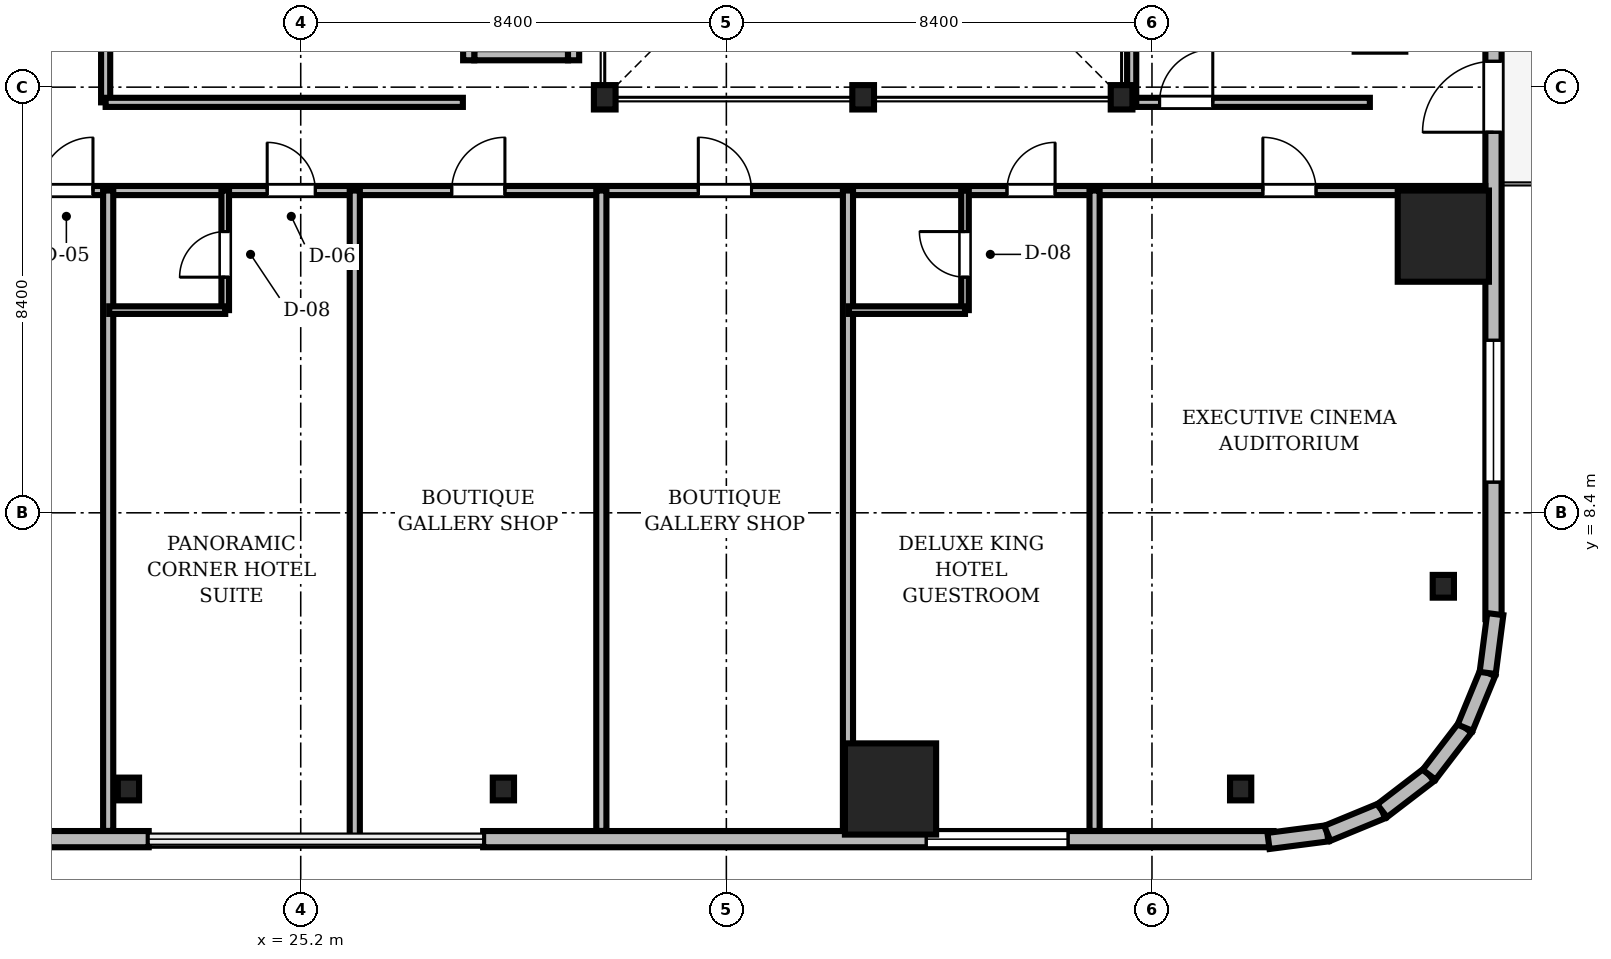
"""IFC4 building model, lengths in metres.
Left out: names, types, materials, properties, quantities, classifications, styles, units other than length and angle.
Written with IfcOpenShell. Run it as: python <this file> out.ifc"""

import sys

from ifc_helpers import new_model, si_unit, direction, frame, frame_2d, origin, origin_2d, place, context, subcontext, project, spatial, rectangle, i_section, extrude, source, transform, mapped, element, fill, save


model = new_model("IFC4")
c1 = context("Model", 3, precision=1e-05, world=origin(), true_north=direction((0.0, 1.0)))
c2 = subcontext(c1, "Body", "Model", "MODEL_VIEW")
j1 = project(units=[si_unit("LENGTHUNIT", "METRE"), si_unit("PLANEANGLEUNIT", "RADIAN")], contexts=[c1])
p1 = place(None, origin())
s1 = spatial("IfcSite", under=j1, at=p1, CompositionType="ELEMENT")
p2 = place(p1, origin())
s2 = spatial("IfcBuilding", under=s1, at=p2, CompositionType="ELEMENT")
p3 = place(p2, frame((0.0, 0.0, 49.5)))
s3 = spatial("IfcBuildingStorey", under=s2, at=p3, CompositionType="ELEMENT", Elevation=49.5)
m1 = source(origin(), c2, "Body", "SweptSolid", [
    extrude(i_section(OverallWidth=0.428, OverallDepth=0.481, WebThickness=0.04, FlangeThickness=0.063, FilletRadius=0.015, at=origin_2d()), origin(), (0.0, 0.0, 1.0), 3.41),
])
for number, where, z_axis, x_axis in (
    (1, (31.2, 16.6, 0.0), (0.0, 0.0, 1.0), (1.0, 0.0, 0.0)),
    (2, (36.3, 16.6, 0.0), (0.0, 0.0, 1.0), (1.0, 0.0, 0.0)),
    (3, (41.4, 16.6, 0.0), (0.0, 0.0, 1.0), (1.0, 0.0, 0.0)),
):
    element("IfcColumn", number, at=place(p3, frame(where, z_axis=z_axis, x_axis=x_axis)), inside=s3, PredefinedType="COLUMN", context=c2, shape_type="MappedRepresentation", body=[
        mapped(m1, transform((0.0, 0.0, 0.0), scale=1.0)),
    ])
m2 = source(origin(), c2, "Body", "SweptSolid", [
    extrude(rectangle(XDim=1.8, YDim=1.8, at=origin_2d()), origin(), (0.0, 0.0, 1.0), 3.41),
])
for number, where, z_axis, x_axis in (
    (4, (36.84, 2.95, 0.0), (0.0, 0.0, 1.0), (1.0, 0.0, 0.0)),
    (5, (47.75, 13.86, 0.0), (0.0, 0.0, 1.0), (1.0, 0.0, 0.0)),
):
    element("IfcColumn", number, at=place(p3, frame(where, z_axis=z_axis, x_axis=x_axis)), inside=s3, PredefinedType="COLUMN", context=c2, shape_type="MappedRepresentation", body=[
        mapped(m2, transform((0.0, 0.0, 0.0), scale=1.0)),
    ])
m3 = source(origin(), c2, "Body", "SweptSolid", [
    extrude(i_section(OverallWidth=0.419, OverallDepth=0.449, WebThickness=0.031, FlangeThickness=0.048, FilletRadius=0.015, at=origin_2d()), origin(), (0.0, 0.0, 1.0), 3.41),
])
for number, where, z_axis, x_axis in (
    (6, (21.8, 2.95, 0.0), (0.0, 0.0, 1.0), (1.0, 0.0, 0.0)),
    (7, (29.2, 2.95, 0.0), (0.0, 0.0, 1.0), (1.0, 0.0, 0.0)),
    (8, (43.75, 2.95, 0.0), (0.0, 0.0, 1.0), (1.0, 0.0, 0.0)),
    (9, (47.75, 6.95, 0.0), (0.0, 0.0, 1.0), (1.0, 0.0, 0.0)),
):
    element("IfcColumn", number, at=place(p3, frame(where, z_axis=z_axis, x_axis=x_axis)), inside=s3, PredefinedType="COLUMN", context=c2, shape_type="MappedRepresentation", body=[
        mapped(m3, transform((0.0, 0.0, 0.0), scale=1.0)),
    ])
m4 = source(origin(), c2, "Body", "SweptSolid", [
    extrude(rectangle(XDim=15.6, YDim=0.32, at=frame_2d((7.8, 0.0))), origin(), (0.0, 0.0, 1.0), 3.41),
])
p4 = place(p3, frame((6.6, 1.96, 0.0), z_axis=(0.0, 0.0, 1.0), x_axis=(1.0, 0.0, 0.0)))
e10 = element("IfcWall", 10, at=p4, inside=s3, PredefinedType="SOLIDWALL", context=c2, shape_type="MappedRepresentation", body=[
    mapped(m4, transform((0.0, 0.0, 0.0), scale=1.0)),
])
m5 = source(origin(), c2, "Body", "SweptSolid", [
    extrude(rectangle(XDim=1.4, YDim=2.3, at=frame_2d((0.7, 1.15))), frame((0.0, 0.17, 0.0), z_axis=(0.0, -1.0, 0.0), x_axis=(1.0, 0.0, 0.0)), (0.0, 0.0, 1.0), 0.34),
])
p5 = place(p4, frame((9.61, 0.0, 0.0)))
e11 = element("IfcOpeningElement", 11, at=p5, cuts=e10, PredefinedType="OPENING", context=c2, shape_type="MappedRepresentation", body=[
    mapped(m5, transform((0.0, 0.0, 0.0), scale=1.0)),
])
m6 = source(origin(), c2, "Body", "SweptSolid", [
    extrude(rectangle(XDim=2.8, YDim=2.4, at=frame_2d((1.4, 1.2))), frame((0.0, 0.17, 0.0), z_axis=(0.0, -1.0, 0.0), x_axis=(1.0, 0.0, 0.0)), (0.0, 0.0, 1.0), 0.34),
])
p6 = place(p4, frame((2.705, 0.0, 0.72)))
e12 = element("IfcOpeningElement", 12, at=p6, cuts=e10, PredefinedType="OPENING", context=c2, shape_type="MappedRepresentation", body=[
    mapped(m6, transform((0.0, 0.0, 0.0), scale=1.0)),
])
p7 = place(p3, frame((28.8, 1.96, 0.0), z_axis=(0.0, 0.0, 1.0), x_axis=(1.0, 0.0, 0.0)))
e13 = element("IfcWall", 13, at=p7, inside=s3, PredefinedType="SOLIDWALL", context=c2, shape_type="MappedRepresentation", body=[
    mapped(m4, transform((0.0, 0.0, 0.0), scale=1.0)),
])
p8 = place(p7, frame((8.745, 0.0, 0.72)))
e14 = element("IfcOpeningElement", 14, at=p8, cuts=e13, PredefinedType="OPENING", context=c2, shape_type="MappedRepresentation", body=[
    mapped(m6, transform((0.0, 0.0, 0.0), scale=1.0)),
])
p9 = place(p3, frame((48.74, 6.3, 0.0), z_axis=(0.0, 0.0, 1.0), x_axis=(0.0, 1.0, 0.0)))
e15 = element("IfcWall", 15, at=p9, inside=s3, PredefinedType="SOLIDWALL", context=c2, shape_type="MappedRepresentation", body=[
    mapped(m4, transform((0.0, 0.0, 0.0), scale=1.0)),
])
p10 = place(p9, frame((9.61, 0.0, 0.0)))
e16 = element("IfcOpeningElement", 16, at=p10, cuts=e15, PredefinedType="OPENING", context=c2, shape_type="MappedRepresentation", body=[
    mapped(m5, transform((0.0, 0.0, 0.0), scale=1.0)),
])
p11 = place(p9, frame((2.705, 0.0, 0.72)))
e17 = element("IfcOpeningElement", 17, at=p11, cuts=e15, PredefinedType="OPENING", context=c2, shape_type="MappedRepresentation", body=[
    mapped(m6, transform((0.0, 0.0, 0.0), scale=1.0)),
])
m7 = source(origin(), c2, "Body", "SweptSolid", [
    extrude(rectangle(XDim=1.17, YDim=0.32, at=frame_2d((0.585, 0.0))), origin(), (0.0, 0.0, 1.0), 3.41),
])
p12 = place(p3, frame((44.3, 1.925, 0.0), z_axis=(0.0, 0.0, 1.0), x_axis=(0.991762485493, 0.128090485085, 0.0)))
e18 = element("IfcWall", 18, at=p12, inside=s3, PredefinedType="SOLIDWALL", context=c2, shape_type="MappedRepresentation", body=[
    mapped(m7, transform((0.0, 0.0, 0.0), scale=1.0)),
])
m8 = source(origin(), c2, "Body", "SweptSolid", [
    extrude(rectangle(XDim=1.169, YDim=0.32, at=frame_2d((0.585, 0.0))), origin(), (0.0, 0.0, 1.0), 3.41),
])
p13 = place(p3, frame((45.46, 2.074, 0.0), z_axis=(0.0, 0.0, 1.0), x_axis=(0.924479075121, 0.381232789334, 0.0)))
e19 = element("IfcWall", 19, at=p13, inside=s3, PredefinedType="SOLIDWALL", context=c2, shape_type="MappedRepresentation", body=[
    mapped(m8, transform((0.0, 0.0, 0.0), scale=1.0)),
])
m9 = source(origin(), c2, "Body", "SweptSolid", [
    extrude(rectangle(XDim=1.169, YDim=0.32, at=frame_2d((0.584, 0.0))), origin(), (0.0, 0.0, 1.0), 3.41),
])
p14 = place(p3, frame((46.541, 2.52, 0.0), z_axis=(0.0, 0.0, 1.0), x_axis=(0.793663520347, 0.608356981114, 0.0)))
e20 = element("IfcWall", 20, at=p14, inside=s3, PredefinedType="SOLIDWALL", context=c2, shape_type="MappedRepresentation", body=[
    mapped(m9, transform((0.0, 0.0, 0.0), scale=1.0)),
])
m10 = source(origin(), c2, "Body", "SweptSolid", [
    extrude(rectangle(XDim=1.169, YDim=0.32, at=frame_2d((0.584, 0.0))), origin(), (0.0, 0.0, 1.0), 3.41),
])
for number, where, z_axis, x_axis in (
    (21, (47.469, 3.231, 0.0), (0.0, 0.0, 1.0), (0.608, 0.794, 0.0)),
    (22, (48.18, 4.159, 0.0), (0.0, 0.0, 1.0), (0.381, 0.925, 0.0)),
):
    element("IfcWall", number, at=place(p3, frame(where, z_axis=z_axis, x_axis=x_axis)), inside=s3, PredefinedType="SOLIDWALL", context=c2, shape_type="MappedRepresentation", body=[
        mapped(m10, transform((0.0, 0.0, 0.0), scale=1.0)),
    ])
m11 = source(origin(), c2, "Body", "SweptSolid", [
    extrude(rectangle(XDim=1.171, YDim=0.32, at=frame_2d((0.585, 0.0))), origin(), (0.0, 0.0, 1.0), 3.41),
])
p15 = place(p3, frame((48.625, 5.24, 0.0), z_axis=(0.0, 0.0, 1.0), x_axis=(0.128269133229, 0.991739395941, 0.0)))
e23 = element("IfcWall", 23, at=p15, inside=s3, PredefinedType="SOLIDWALL", context=c2, shape_type="MappedRepresentation", body=[
    mapped(m11, transform((0.0, 0.0, 0.0), scale=1.0)),
])
m12 = source(origin(), c2, "Body", "SweptSolid", [
    extrude(rectangle(XDim=1.85, YDim=0.22, at=frame_2d((0.925, 0.0))), origin(), (0.0, 0.0, 1.0), 3.41),
])
p16 = place(p3, frame((28.625, 17.44, 0.0), z_axis=(0.0, 0.0, 1.0), x_axis=(1.0, 0.0, 0.0)))
e24 = element("IfcWall", 24, at=p16, inside=s3, PredefinedType="SOLIDWALL", context=c2, shape_type="MappedRepresentation", body=[
    mapped(m12, transform((0.0, 0.0, 0.0), scale=1.0)),
])
m13 = source(origin(), c2, "Body", "SweptSolid", [
    extrude(rectangle(XDim=2.54, YDim=0.22, at=frame_2d((1.27, 0.0))), origin(), (0.0, 0.0, 1.0), 3.41),
])
for number, where, z_axis, x_axis in (
    (25, (28.515, 17.33, 0.0), (0.0, 0.0, 1.0), (0.0, 1.0, 0.0)),
    (26, (30.585, 17.33, 0.0), (0.0, 0.0, 1.0), (0.0, 1.0, 0.0)),
):
    element("IfcWall", number, at=place(p3, frame(where, z_axis=z_axis, x_axis=x_axis)), inside=s3, PredefinedType="SOLIDWALL", context=c2, shape_type="MappedRepresentation", body=[
        mapped(m13, transform((0.0, 0.0, 0.0), scale=1.0)),
    ])
m14 = source(origin(), c2, "Body", "SweptSolid", [
    extrude(rectangle(XDim=46.156, YDim=0.18, at=frame_2d((23.078, 0.0))), origin(), (0.0, 0.0, 1.0), 2.652),
])
p17 = place(p3, frame((2.422, 14.76, 0.0), z_axis=(0.0, 0.0, 1.0), x_axis=(1.0, 0.0, 0.0)))
e27 = element("IfcWall", 27, at=p17, inside=s3, PredefinedType="PARTITIONING", context=c2, shape_type="MappedRepresentation", body=[
    mapped(m14, transform((0.0, 0.0, 0.0), scale=1.0)),
])
m15 = source(origin(), c2, "Body", "SweptSolid", [
    extrude(rectangle(XDim=1.05, YDim=2.2, at=frame_2d((0.525, 1.1))), frame((0.0, 0.1, 0.0), z_axis=(0.0, -1.0, 0.0), x_axis=(1.0, 0.0, 0.0)), (0.0, 0.0, 1.0), 0.2),
])
p18 = place(p17, frame((17.628, 0.0, 0.0)))
e28 = element("IfcOpeningElement", 28, at=p18, cuts=e27, PredefinedType="OPENING", context=c2, shape_type="MappedRepresentation", body=[
    mapped(m15, transform((0.0, 0.0, 0.0), scale=1.0)),
])
m16 = source(origin(), c2, "Body", "SweptSolid", [
    extrude(rectangle(XDim=0.95, YDim=2.15, at=frame_2d((0.475, 1.075))), frame((0.0, 0.1, 0.0), z_axis=(0.0, -1.0, 0.0), x_axis=(1.0, 0.0, 0.0)), (0.0, 0.0, 1.0), 0.2),
])
p19 = place(p17, frame((22.116, 0.0, 0.0)))
e29 = element("IfcOpeningElement", 29, at=p19, cuts=e27, PredefinedType="OPENING", context=c2, shape_type="MappedRepresentation", body=[
    mapped(m16, transform((0.0, 0.0, 0.0), scale=1.0)),
])
p20 = place(p17, frame((25.758, 0.0, 0.0)))
e30 = element("IfcOpeningElement", 30, at=p20, cuts=e27, PredefinedType="OPENING", context=c2, shape_type="MappedRepresentation", body=[
    mapped(m15, transform((0.0, 0.0, 0.0), scale=1.0)),
])
p21 = place(p17, frame((30.625, 0.0, 0.0)))
e31 = element("IfcOpeningElement", 31, at=p21, cuts=e27, PredefinedType="OPENING", context=c2, shape_type="MappedRepresentation", body=[
    mapped(m15, transform((0.0, 0.0, 0.0), scale=1.0)),
])
p22 = place(p17, frame((36.716, 0.0, 0.0)))
e32 = element("IfcOpeningElement", 32, at=p22, cuts=e27, PredefinedType="OPENING", context=c2, shape_type="MappedRepresentation", body=[
    mapped(m16, transform((0.0, 0.0, 0.0), scale=1.0)),
])
p23 = place(p17, frame((41.766, 0.0, 0.0)))
e33 = element("IfcOpeningElement", 33, at=p23, cuts=e27, PredefinedType="OPENING", context=c2, shape_type="MappedRepresentation", body=[
    mapped(m15, transform((0.0, 0.0, 0.0), scale=1.0)),
])
m17 = source(origin(), c2, "Body", "SweptSolid", [
    extrude(rectangle(XDim=11.94, YDim=0.18, at=frame_2d((5.97, 0.0))), origin(), (0.0, 0.0, 1.0), 2.802),
])
p24 = place(p3, frame((21.35, 16.5, 0.0), z_axis=(0.0, 0.0, 1.0), x_axis=(0.0, 1.0, 0.0)))
e34 = element("IfcWall", 34, at=p24, inside=s3, PredefinedType="PARTITIONING", context=c2, shape_type="MappedRepresentation", body=[
    mapped(m17, transform((0.0, 0.0, 0.0), scale=1.0)),
])
p25 = place(p24, frame((4.5, 0.0, 0.0)))
e35 = element("IfcOpeningElement", 35, at=p25, cuts=e34, PredefinedType="OPENING", context=c2, shape_type="MappedRepresentation", body=[
    mapped(m15, transform((0.0, 0.0, 0.0), scale=1.0)),
])
m18 = source(origin(), c2, "Body", "SweptSolid", [
    extrude(rectangle(XDim=4.7, YDim=0.18, at=frame_2d((2.35, 0.0))), origin(), (0.0, 0.0, 1.0), 2.802),
])
p26 = place(p3, frame((41.6, 16.5, 0.0), z_axis=(0.0, 0.0, 1.0), x_axis=(1.0, 0.0, 0.0)))
e36 = element("IfcWall", 36, at=p26, inside=s3, PredefinedType="PARTITIONING", context=c2, shape_type="MappedRepresentation", body=[
    mapped(m18, transform((0.0, 0.0, 0.0), scale=1.0)),
])
p27 = place(p26, frame((0.55, 0.0, 0.0)))
e37 = element("IfcOpeningElement", 37, at=p27, cuts=e36, PredefinedType="OPENING", context=c2, shape_type="MappedRepresentation", body=[
    mapped(m15, transform((0.0, 0.0, 0.0), scale=1.0)),
])
m19 = source(origin(), c2, "Body", "SweptSolid", [
    extrude(rectangle(XDim=2.36, YDim=0.15, at=frame_2d((1.18, 0.0))), origin(), (0.0, 0.0, 1.0), 3.41),
])
p28 = place(p3, frame((23.71, 12.4, 0.0), z_axis=(0.0, 0.0, 1.0), x_axis=(0.0, 1.0, 0.0)))
e38 = element("IfcWall", 38, at=p28, inside=s3, PredefinedType="PARTITIONING", context=c2, shape_type="MappedRepresentation", body=[
    mapped(m19, transform((0.0, 0.0, 0.0), scale=1.0)),
])
m20 = source(origin(), c2, "Body", "SweptSolid", [
    extrude(rectangle(XDim=0.9, YDim=2.1, at=frame_2d((0.45, 1.05))), frame((0.0, 0.085, 0.0), z_axis=(0.0, -1.0, 0.0), x_axis=(1.0, 0.0, 0.0)), (0.0, 0.0, 1.0), 0.17),
])
p29 = place(p28, frame((0.65, 0.0, 0.0)))
e39 = element("IfcOpeningElement", 39, at=p29, cuts=e38, PredefinedType="OPENING", context=c2, shape_type="MappedRepresentation", body=[
    mapped(m20, transform((0.0, 0.0, 0.0), scale=1.0)),
])
p30 = place(p3, frame((38.31, 12.4, 0.0), z_axis=(0.0, 0.0, 1.0), x_axis=(0.0, 1.0, 0.0)))
e40 = element("IfcWall", 40, at=p30, inside=s3, PredefinedType="PARTITIONING", context=c2, shape_type="MappedRepresentation", body=[
    mapped(m19, transform((0.0, 0.0, 0.0), scale=1.0)),
])
p31 = place(p30, frame((0.65, 0.0, 0.0)))
e41 = element("IfcOpeningElement", 41, at=p31, cuts=e40, PredefinedType="OPENING", context=c2, shape_type="MappedRepresentation", body=[
    mapped(m20, transform((0.0, 0.0, 0.0), scale=1.0)),
])
m21 = source(origin(), c2, "Body", "SweptSolid", [
    extrude(rectangle(XDim=12.638, YDim=0.2, at=frame_2d((6.319, 0.0))), origin(), (0.0, 0.0, 1.0), 2.652),
])
p32 = place(p3, frame((21.4, 2.122, 0.0), z_axis=(0.0, 0.0, 1.0), x_axis=(0.0, 1.0, 0.0)))
e42 = element("IfcWall", 42, at=p32, inside=s3, PredefinedType="PARTITIONING", context=c2, shape_type="MappedRepresentation", body=[
    mapped(m21, transform((0.0, 0.0, 0.0), scale=1.0)),
])
m22 = source(origin(), c2, "Body", "SweptSolid", [
    extrude(rectangle(XDim=12.83, YDim=0.2, at=frame_2d((6.415, 0.0))), origin(), (0.0, 0.0, 1.0), 2.652),
])
p33 = place(p3, frame((26.267, 1.93, 0.0), z_axis=(0.0, 0.0, 1.0), x_axis=(0.0, 1.0, 0.0)))
e43 = element("IfcWall", 43, at=p33, inside=s3, PredefinedType="PARTITIONING", context=c2, shape_type="MappedRepresentation", body=[
    mapped(m22, transform((0.0, 0.0, 0.0), scale=1.0)),
])
for number, where, z_axis, x_axis in (
    (44, (31.133, 2.122, 0.0), (0.0, 0.0, 1.0), (0.0, 1.0, 0.0)),
    (45, (36.0, 2.122, 0.0), (0.0, 0.0, 1.0), (0.0, 1.0, 0.0)),
    (46, (40.867, 2.122, 0.0), (0.0, 0.0, 1.0), (0.0, 1.0, 0.0)),
):
    element("IfcWall", number, at=place(p3, frame(where, z_axis=z_axis, x_axis=x_axis)), inside=s3, PredefinedType="PARTITIONING", context=c2, shape_type="MappedRepresentation", body=[
        mapped(m21, transform((0.0, 0.0, 0.0), scale=1.0)),
    ])
m23 = source(origin(), c2, "Body", "SweptSolid", [
    extrude(rectangle(XDim=7.15, YDim=0.18, at=frame_2d((3.575, 0.0))), origin(), (0.0, 0.0, 1.0), 2.802),
])
p34 = place(p3, frame((41.6, 16.5, 0.0), z_axis=(0.0, 0.0, 1.0), x_axis=(0.0, 1.0, 0.0)))
e47 = element("IfcWall", 47, at=p34, inside=s3, PredefinedType="PARTITIONING", context=c2, shape_type="MappedRepresentation", body=[
    mapped(m23, transform((0.0, 0.0, 0.0), scale=1.0)),
])
m24 = source(origin(), c2, "Body", "SweptSolid", [
    extrude(rectangle(XDim=7.05, YDim=0.18, at=frame_2d((3.525, 0.0))), origin(), (0.0, 0.0, 1.0), 2.802),
])
p35 = place(p3, frame((21.35, 16.5, 0.0), z_axis=(0.0, 0.0, 1.0), x_axis=(1.0, 0.0, 0.0)))
e48 = element("IfcWall", 48, at=p35, inside=s3, PredefinedType="PARTITIONING", context=c2, shape_type="MappedRepresentation", body=[
    mapped(m24, transform((0.0, 0.0, 0.0), scale=1.0)),
])
m25 = source(origin(), c2, "Body", "SweptSolid", [
    extrude(rectangle(XDim=2.29, YDim=0.15, at=frame_2d((1.145, 0.0))), origin(), (0.0, 0.0, 1.0), 3.41),
])
for number, where, z_axis, x_axis in (
    (49, (21.42, 12.4, 0.0), (0.0, 0.0, 1.0), (1.0, 0.0, 0.0)),
    (50, (36.02, 12.4, 0.0), (0.0, 0.0, 1.0), (1.0, 0.0, 0.0)),
):
    element("IfcWall", number, at=place(p3, frame(where, z_axis=z_axis, x_axis=x_axis)), inside=s3, PredefinedType="PARTITIONING", context=c2, shape_type="MappedRepresentation", body=[
        mapped(m25, transform((0.0, 0.0, 0.0), scale=1.0)),
    ])
m26 = source(origin(), c2, "Body", "SweptSolid", [
    extrude(rectangle(XDim=2.8, YDim=2.4, at=frame_2d((1.4, 1.2))), frame((0.0, 0.03, 0.0), z_axis=(0.0, -1.0, 0.0), x_axis=(1.0, 0.0, 0.0)), (0.0, 0.0, 1.0), 0.06),
])
p36 = place(p8, origin())
e51 = element("IfcWindow", 51, at=p36, inside=s3, PartitioningType="SINGLE_PANEL", PredefinedType="WINDOW", context=c2, shape_type="MappedRepresentation", body=[
    mapped(m26, transform((0.0, 0.0, 0.0), scale=1.0)),
])
fill(e14, e51)
m27 = source(origin(), c2, "Body", "SweptSolid", [
    extrude(rectangle(XDim=1.4, YDim=2.3, at=frame_2d((0.7, 1.15))), frame((0.0, 0.025, 0.0), z_axis=(0.0, -1.0, 0.0), x_axis=(1.0, 0.0, 0.0)), (0.0, 0.0, 1.0), 0.05),
])
p37 = place(p10, frame((1.4, 0.0, 0.0), z_axis=(0.0, 0.0, 1.0), x_axis=(-1.0, 0.0, 0.0)))
e52 = element("IfcDoor", 52, at=p37, inside=s3, OperationType="DOUBLE_DOOR_SLIDING", PredefinedType="DOOR", context=c2, shape_type="MappedRepresentation", body=[
    mapped(m27, transform((0.0, 0.0, 0.0), scale=1.0)),
])
fill(e16, e52)
p38 = place(p11, origin())
e53 = element("IfcWindow", 53, at=p38, inside=s3, PartitioningType="SINGLE_PANEL", PredefinedType="WINDOW", context=c2, shape_type="MappedRepresentation", body=[
    mapped(m26, transform((0.0, 0.0, 0.0), scale=1.0)),
])
fill(e17, e53)
m28 = source(origin(), c2, "Body", "SweptSolid", [
    extrude(rectangle(XDim=1.05, YDim=2.2, at=frame_2d((0.525, 1.1))), frame((0.0, 0.025, 0.0), z_axis=(0.0, -1.0, 0.0), x_axis=(1.0, 0.0, 0.0)), (0.0, 0.0, 1.0), 0.05),
])
p39 = place(p18, origin())
e54 = element("IfcDoor", 54, at=p39, inside=s3, OperationType="SINGLE_SWING_RIGHT", PredefinedType="DOOR", context=c2, shape_type="MappedRepresentation", body=[
    mapped(m28, transform((0.0, 0.0, 0.0), scale=1.0)),
])
fill(e28, e54)
m29 = source(origin(), c2, "Body", "SweptSolid", [
    extrude(rectangle(XDim=0.95, YDim=2.15, at=frame_2d((0.475, 1.075))), frame((0.0, 0.025, 0.0), z_axis=(0.0, -1.0, 0.0), x_axis=(1.0, 0.0, 0.0)), (0.0, 0.0, 1.0), 0.05),
])
p40 = place(p19, origin())
e55 = element("IfcDoor", 55, at=p40, inside=s3, OperationType="SINGLE_SWING_LEFT", PredefinedType="DOOR", context=c2, shape_type="MappedRepresentation", body=[
    mapped(m29, transform((0.0, 0.0, 0.0), scale=1.0)),
])
fill(e29, e55)
p41 = place(p20, origin())
e56 = element("IfcDoor", 56, at=p41, inside=s3, OperationType="SINGLE_SWING_RIGHT", PredefinedType="DOOR", context=c2, shape_type="MappedRepresentation", body=[
    mapped(m28, transform((0.0, 0.0, 0.0), scale=1.0)),
])
fill(e30, e56)
p42 = place(p21, origin())
e57 = element("IfcDoor", 57, at=p42, inside=s3, OperationType="SINGLE_SWING_LEFT", PredefinedType="DOOR", context=c2, shape_type="MappedRepresentation", body=[
    mapped(m28, transform((0.0, 0.0, 0.0), scale=1.0)),
])
fill(e31, e57)
p43 = place(p22, origin())
e58 = element("IfcDoor", 58, at=p43, inside=s3, OperationType="SINGLE_SWING_RIGHT", PredefinedType="DOOR", context=c2, shape_type="MappedRepresentation", body=[
    mapped(m29, transform((0.0, 0.0, 0.0), scale=1.0)),
])
fill(e32, e58)
p44 = place(p23, origin())
e59 = element("IfcDoor", 59, at=p44, inside=s3, OperationType="SINGLE_SWING_LEFT", PredefinedType="DOOR", context=c2, shape_type="MappedRepresentation", body=[
    mapped(m28, transform((0.0, 0.0, 0.0), scale=1.0)),
])
fill(e33, e59)
p45 = place(p27, origin())
e60 = element("IfcDoor", 60, at=p45, inside=s3, OperationType="SINGLE_SWING_RIGHT", PredefinedType="DOOR", context=c2, shape_type="MappedRepresentation", body=[
    mapped(m28, transform((0.0, 0.0, 0.0), scale=1.0)),
])
fill(e37, e60)
m30 = source(origin(), c2, "Body", "SweptSolid", [
    extrude(rectangle(XDim=0.9, YDim=2.1, at=frame_2d((0.45, 1.05))), frame((0.0, 0.025, 0.0), z_axis=(0.0, -1.0, 0.0), x_axis=(1.0, 0.0, 0.0)), (0.0, 0.0, 1.0), 0.05),
])
p46 = place(p29, origin())
e61 = element("IfcDoor", 61, at=p46, inside=s3, OperationType="SINGLE_SWING_LEFT", PredefinedType="DOOR", context=c2, shape_type="MappedRepresentation", body=[
    mapped(m30, transform((0.0, 0.0, 0.0), scale=1.0)),
])
fill(e39, e61)
p47 = place(p31, origin())
e62 = element("IfcDoor", 62, at=p47, inside=s3, OperationType="SINGLE_SWING_RIGHT", PredefinedType="DOOR", context=c2, shape_type="MappedRepresentation", body=[
    mapped(m30, transform((0.0, 0.0, 0.0), scale=1.0)),
])
fill(e41, e62)
save(model, sys.argv[1])
